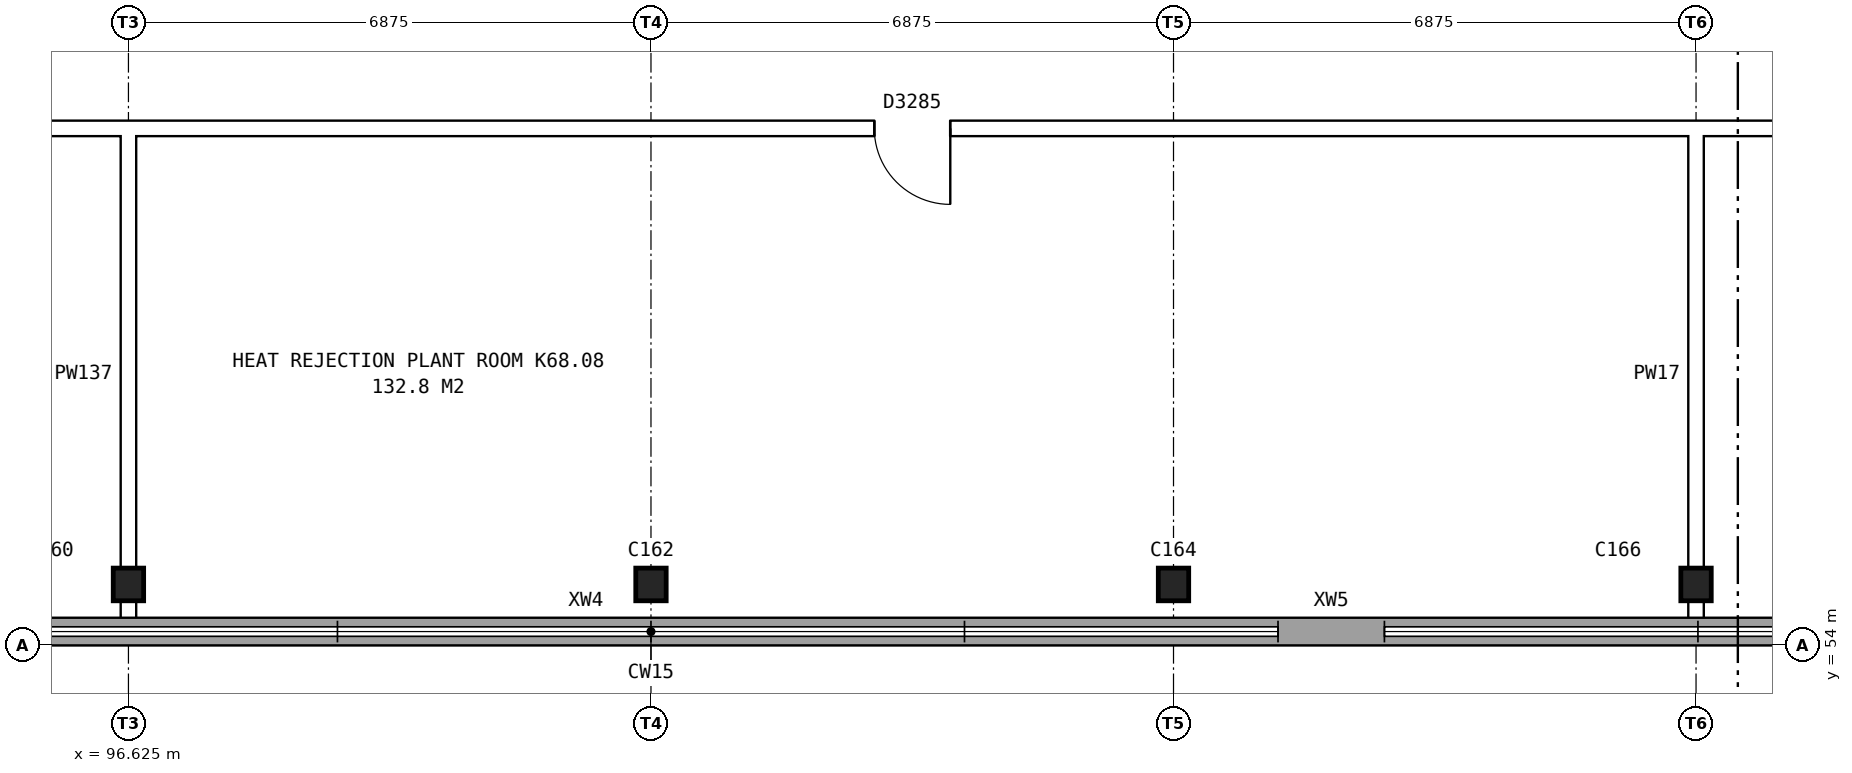
"""IFC4 building model, lengths in metres.
Left out: names, types, materials, properties, quantities, classifications, styles, units other than length and angle.
Written with IfcOpenShell. Run it as: python <this file> out.ifc"""

import sys

from ifc_helpers import new_model, si_unit, direction, frame, frame_2d, origin, origin_2d, place, context, subcontext, project, spatial, rectangle, i_section, extrude, element, fill, save


model = new_model("IFC4")
c1 = context("Model", 3, precision=1e-05, world=origin(), true_north=direction((0.0, 1.0)))
c2 = subcontext(c1, "Body", "Model", "MODEL_VIEW")
j1 = project(units=[si_unit("LENGTHUNIT", "METRE"), si_unit("PLANEANGLEUNIT", "RADIAN")], contexts=[c1])
p1 = place(None, origin())
s1 = spatial("IfcSite", under=j1, at=p1, CompositionType="ELEMENT")
p2 = place(p1, origin())
s2 = spatial("IfcBuilding", under=s1, at=p2, CompositionType="ELEMENT")
p3 = place(p2, frame((0.0, 0.0, 243.9)))
s3 = spatial("IfcBuildingStorey", under=s2, at=p3, CompositionType="ELEMENT", Elevation=243.9)
for number, where, z_axis, x_axis in (
    (1, (96.625, 54.8, 0.0), (0.0, 0.0, 1.0), (1.0, 0.0, 0.0)),
    (2, (103.5, 54.8, 0.0), (0.0, 0.0, 1.0), (1.0, 0.0, 0.0)),
    (3, (110.375, 54.8, 0.0), (0.0, 0.0, 1.0), (1.0, 0.0, 0.0)),
    (4, (117.25, 54.8, 0.0), (0.0, 0.0, 1.0), (1.0, 0.0, 0.0)),
):
    element("IfcColumn", number, at=place(p3, frame(where, z_axis=z_axis, x_axis=x_axis)), inside=s3, PredefinedType="COLUMN", context=c2, shape_type="SweptSolid", body=[
        extrude(i_section(OverallWidth=0.4, OverallDepth=0.43, WebThickness=0.028, FlangeThickness=0.04, at=origin_2d()), origin(), (0.0, 0.0, 1.0), 3.163),
    ])
p4 = place(p3, frame((95.25, 54.18, 0.0), z_axis=(0.0, 0.0, 1.0), x_axis=(1.0, 0.0, 0.0)))
e5 = element("IfcWall", 5, at=p4, inside=s3, PredefinedType="STANDARD", context=c2, shape_type="SweptSolid", body=[
    extrude(rectangle(XDim=16.5, YDim=0.36, at=frame_2d((8.25, 0.0))), origin(), (0.0, 0.0, 1.0), 1.1),
])
p5 = place(p3, frame((111.75, 54.18, 0.0), z_axis=(0.0, 0.0, 1.0), x_axis=(1.0, 0.0, 0.0)))
e6 = element("IfcWall", 6, at=p5, inside=s3, PredefinedType="STANDARD", context=c2, shape_type="SweptSolid", body=[
    extrude(rectangle(XDim=1.4, YDim=0.36, at=frame_2d((0.7, 0.0))), origin(), (0.0, 0.0, 1.0), 3.39),
])
p6 = place(p3, frame((113.15, 54.18, 0.0), z_axis=(0.0, 0.0, 1.0), x_axis=(1.0, 0.0, 0.0)))
e7 = element("IfcWall", 7, at=p6, inside=s3, PredefinedType="STANDARD", context=c2, shape_type="SweptSolid", body=[
    extrude(rectangle(XDim=16.5, YDim=0.36, at=frame_2d((8.25, 0.0))), origin(), (0.0, 0.0, 1.0), 1.1),
])
p7 = place(p3, frame((32.24, 60.8, 0.0), z_axis=(0.0, 0.0, 1.0), x_axis=(1.0, 0.0, 0.0)))
e8 = element("IfcWall", 8, at=p7, inside=s3, PredefinedType="PARTITIONING", context=c2, shape_type="SweptSolid", body=[
    extrude(rectangle(XDim=136.52, YDim=0.2, at=frame_2d((68.26, 0.0))), origin(), (0.0, 0.0, 1.0), 3.3),
])
p8 = place(p7, frame((4.94, 0.0, 0.0)))
e9 = element("IfcOpeningElement", 9, at=p8, cuts=e8, PredefinedType="OPENING", context=c2, shape_type="SweptSolid", body=[
    extrude(rectangle(XDim=1.0, YDim=2.1, at=frame_2d((0.5, 1.05))), frame((0.0, 0.11, 0.0), z_axis=(0.0, -1.0, 0.0), x_axis=(1.0, 0.0, 0.0)), (0.0, 0.0, 1.0), 0.22),
])
p9 = place(p7, frame((14.76, 0.0, 0.0)))
e10 = element("IfcOpeningElement", 10, at=p9, cuts=e8, PredefinedType="OPENING", context=c2, shape_type="SweptSolid", body=[
    extrude(rectangle(XDim=1.0, YDim=2.1, at=frame_2d((0.5, 1.05))), frame((0.0, 0.11, 0.0), z_axis=(0.0, -1.0, 0.0), x_axis=(1.0, 0.0, 0.0)), (0.0, 0.0, 1.0), 0.22),
])
p10 = place(p7, frame((25.26, 0.0, 0.0)))
e11 = element("IfcOpeningElement", 11, at=p10, cuts=e8, PredefinedType="OPENING", context=c2, shape_type="SweptSolid", body=[
    extrude(rectangle(XDim=1.0, YDim=2.1, at=frame_2d((0.5, 1.05))), frame((0.0, 0.11, 0.0), z_axis=(0.0, -1.0, 0.0), x_axis=(1.0, 0.0, 0.0)), (0.0, 0.0, 1.0), 0.22),
])
p11 = place(p7, frame((37.08, 0.0, 0.0)))
e12 = element("IfcOpeningElement", 12, at=p11, cuts=e8, PredefinedType="OPENING", context=c2, shape_type="SweptSolid", body=[
    extrude(rectangle(XDim=1.0, YDim=2.1, at=frame_2d((0.5, 1.05))), frame((0.0, 0.11, 0.0), z_axis=(0.0, -1.0, 0.0), x_axis=(1.0, 0.0, 0.0)), (0.0, 0.0, 1.0), 0.22),
])
p12 = place(p7, frame((53.392, 0.0, 0.0)))
e13 = element("IfcOpeningElement", 13, at=p12, cuts=e8, PredefinedType="OPENING", context=c2, shape_type="SweptSolid", body=[
    extrude(rectangle(XDim=1.0, YDim=2.1, at=frame_2d((0.5, 1.05))), frame((0.0, 0.11, 0.0), z_axis=(0.0, -1.0, 0.0), x_axis=(1.0, 0.0, 0.0)), (0.0, 0.0, 1.0), 0.22),
])
p13 = place(p7, frame((74.198, 0.0, 0.0)))
e14 = element("IfcOpeningElement", 14, at=p13, cuts=e8, PredefinedType="OPENING", context=c2, shape_type="SweptSolid", body=[
    extrude(rectangle(XDim=1.0, YDim=2.1, at=frame_2d((0.5, 1.05))), frame((0.0, 0.11, 0.0), z_axis=(0.0, -1.0, 0.0), x_axis=(1.0, 0.0, 0.0)), (0.0, 0.0, 1.0), 0.22),
])
p14 = place(p7, frame((91.565, 0.0, 0.0)))
e15 = element("IfcOpeningElement", 15, at=p14, cuts=e8, PredefinedType="OPENING", context=c2, shape_type="SweptSolid", body=[
    extrude(rectangle(XDim=1.0, YDim=2.1, at=frame_2d((0.5, 1.05))), frame((0.0, 0.11, 0.0), z_axis=(0.0, -1.0, 0.0), x_axis=(1.0, 0.0, 0.0)), (0.0, 0.0, 1.0), 0.22),
])
p15 = place(p7, frame((104.44, 0.0, 0.0)))
e16 = element("IfcOpeningElement", 16, at=p15, cuts=e8, PredefinedType="OPENING", context=c2, shape_type="SweptSolid", body=[
    extrude(rectangle(XDim=1.0, YDim=2.1, at=frame_2d((0.5, 1.05))), frame((0.0, 0.11, 0.0), z_axis=(0.0, -1.0, 0.0), x_axis=(1.0, 0.0, 0.0)), (0.0, 0.0, 1.0), 0.22),
])
p16 = place(p7, frame((116.26, 0.0, 0.0)))
e17 = element("IfcOpeningElement", 17, at=p16, cuts=e8, PredefinedType="OPENING", context=c2, shape_type="SweptSolid", body=[
    extrude(rectangle(XDim=1.0, YDim=2.1, at=frame_2d((0.5, 1.05))), frame((0.0, 0.11, 0.0), z_axis=(0.0, -1.0, 0.0), x_axis=(1.0, 0.0, 0.0)), (0.0, 0.0, 1.0), 0.22),
])
p17 = place(p7, frame((129.08, 0.0, 0.0)))
e18 = element("IfcOpeningElement", 18, at=p17, cuts=e8, PredefinedType="OPENING", context=c2, shape_type="SweptSolid", body=[
    extrude(rectangle(XDim=1.0, YDim=2.1, at=frame_2d((0.5, 1.05))), frame((0.0, 0.11, 0.0), z_axis=(0.0, -1.0, 0.0), x_axis=(1.0, 0.0, 0.0)), (0.0, 0.0, 1.0), 0.22),
])
for number, where, z_axis, x_axis in (
    (19, (96.625, 54.24, 0.0), (0.0, 0.0, 1.0), (0.0, 1.0, 0.0)),
    (20, (117.25, 54.24, 0.0), (0.0, 0.0, 1.0), (0.0, 1.0, 0.0)),
):
    element("IfcWall", number, at=place(p3, frame(where, z_axis=z_axis, x_axis=x_axis)), inside=s3, PredefinedType="PARTITIONING", context=c2, shape_type="SweptSolid", body=[
        extrude(rectangle(XDim=6.66, YDim=0.2, at=frame_2d((3.33, 0.0))), origin(), (0.0, 0.0, 1.0), 3.3),
    ])
p18 = place(p13, frame((1.0, 0.0, 0.0), z_axis=(0.0, 0.0, 1.0), x_axis=(-1.0, 0.0, 0.0)))
e21 = element("IfcDoor", 21, at=p18, inside=s3, OperationType="SINGLE_SWING_LEFT", PredefinedType="DOOR", context=c2, shape_type="SweptSolid", body=[
    extrude(rectangle(XDim=1.0, YDim=2.1, at=frame_2d((0.5, 1.05))), frame((0.0, 0.025, 0.0), z_axis=(0.0, -1.0, 0.0), x_axis=(1.0, 0.0, 0.0)), (0.0, 0.0, 1.0), 0.05),
])
fill(e14, e21)
save(model, sys.argv[1])
